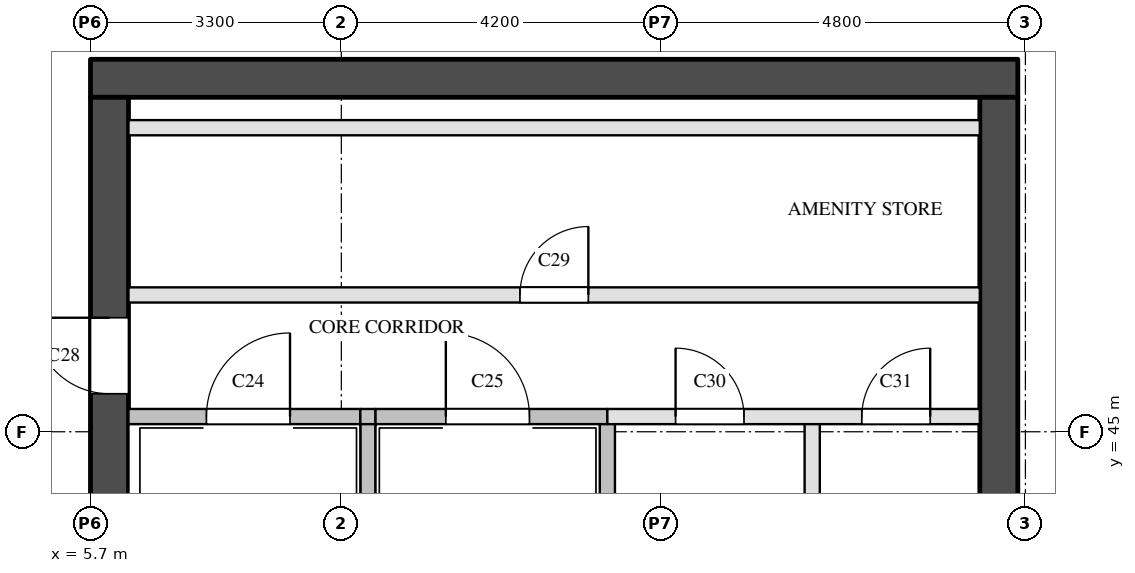
"""IFC4 building model, lengths in metres.
Left out: names, types, materials, properties, quantities, classifications, styles, units other than length and angle.
Written with IfcOpenShell. Run it as: python <this file> out.ifc"""

import sys

from ifc_helpers import new_model, si_unit, direction, frame, frame_2d, origin, place, context, subcontext, project, spatial, rectangle, extrude, element, fill, save


model = new_model("IFC4")
c1 = context("Model", 3, precision=1e-05, world=origin(), true_north=direction((0.0, 1.0)))
c2 = subcontext(c1, "Body", "Model", "MODEL_VIEW")
j1 = project(units=[si_unit("LENGTHUNIT", "METRE"), si_unit("PLANEANGLEUNIT", "RADIAN")], contexts=[c1])
p1 = place(None, origin())
s1 = spatial("IfcSite", under=j1, at=p1, CompositionType="ELEMENT")
p2 = place(p1, origin())
s2 = spatial("IfcBuilding", under=s1, at=p2, CompositionType="ELEMENT")
p3 = place(p2, frame((0.0, 0.0, 129.4)))
s3 = spatial("IfcBuildingStorey", under=s2, at=p3, CompositionType="ELEMENT", Elevation=129.4)
p4 = place(p3, frame((5.7, 49.65, 0.0), z_axis=(0.0, 0.0, 1.0), x_axis=(1.0, 0.0, 0.0)))
e1 = element("IfcWall", 1, at=p4, inside=s3, PredefinedType="SHEAR", context=c2, shape_type="SweptSolid", body=[
    extrude(rectangle(XDim=12.2, YDim=0.5, at=frame_2d((6.1, 0.0))), origin(), (0.0, 0.0, 1.0), 5.2),
])
p5 = place(p3, frame((5.95, 29.1, 0.0), z_axis=(0.0, 0.0, 1.0), x_axis=(0.0, 1.0, 0.0)))
e2 = element("IfcWall", 2, at=p5, inside=s3, PredefinedType="SHEAR", context=c2, shape_type="SweptSolid", body=[
    extrude(rectangle(XDim=20.3, YDim=0.5, at=frame_2d((10.15, 0.0))), origin(), (0.0, 0.0, 1.0), 5.2),
])
p6 = place(p5, frame((3.45, 0.0, 0.0)))
e3 = element("IfcOpeningElement", 3, at=p6, cuts=e2, PredefinedType="OPENING", context=c2, shape_type="SweptSolid", body=[
    extrude(rectangle(XDim=1.0, YDim=2.1, at=frame_2d((0.5, 1.05))), frame((0.0, 0.26, 0.0), z_axis=(0.0, -1.0, 0.0), x_axis=(1.0, 0.0, 0.0)), (0.0, 0.0, 1.0), 0.52),
])
p7 = place(p5, frame((16.4, 0.0, 0.0)))
e4 = element("IfcOpeningElement", 4, at=p7, cuts=e2, PredefinedType="OPENING", context=c2, shape_type="SweptSolid", body=[
    extrude(rectangle(XDim=1.0, YDim=2.1, at=frame_2d((0.5, 1.05))), frame((0.0, 0.26, 0.0), z_axis=(0.0, -1.0, 0.0), x_axis=(1.0, 0.0, 0.0)), (0.0, 0.0, 1.0), 0.52),
])
p8 = place(p3, frame((17.65, 29.1, 0.0), z_axis=(0.0, 0.0, 1.0), x_axis=(0.0, 1.0, 0.0)))
e5 = element("IfcWall", 5, at=p8, inside=s3, PredefinedType="SHEAR", context=c2, shape_type="SweptSolid", body=[
    extrude(rectangle(XDim=20.3, YDim=0.5, at=frame_2d((10.15, 0.0))), origin(), (0.0, 0.0, 1.0), 5.2),
])
p9 = place(p8, frame((1.25, 0.0, 0.0)))
e6 = element("IfcOpeningElement", 6, at=p9, cuts=e5, PredefinedType="OPENING", context=c2, shape_type="SweptSolid", body=[
    extrude(rectangle(XDim=0.7, YDim=2.1, at=frame_2d((0.35, 1.05))), frame((0.0, 0.26, 0.0), z_axis=(0.0, -1.0, 0.0), x_axis=(1.0, 0.0, 0.0)), (0.0, 0.0, 1.0), 0.52),
])
p10 = place(p8, frame((7.05, 0.0, 0.0)))
e7 = element("IfcOpeningElement", 7, at=p10, cuts=e5, PredefinedType="OPENING", context=c2, shape_type="SweptSolid", body=[
    extrude(rectangle(XDim=0.7, YDim=2.1, at=frame_2d((0.35, 1.05))), frame((0.0, 0.26, 0.0), z_axis=(0.0, -1.0, 0.0), x_axis=(1.0, 0.0, 0.0)), (0.0, 0.0, 1.0), 0.52),
])
p11 = place(p8, frame((3.6, 0.0, 0.0)))
e8 = element("IfcOpeningElement", 8, at=p11, cuts=e5, PredefinedType="OPENING", context=c2, shape_type="SweptSolid", body=[
    extrude(rectangle(XDim=1.8, YDim=2.1, at=frame_2d((0.9, 1.05))), frame((0.0, 0.26, 0.0), z_axis=(0.0, -1.0, 0.0), x_axis=(1.0, 0.0, 0.0)), (0.0, 0.0, 1.0), 0.52),
])
for number, where, z_axis, x_axis in (
    (9, (9.35, 43.7, 0.0), (0.0, 0.0, 1.0), (0.0, 1.0, 0.0)),
    (10, (12.5, 43.7, 0.0), (0.0, 0.0, 1.0), (0.0, 1.0, 0.0)),
):
    element("IfcWall", number, at=place(p3, frame(where, z_axis=z_axis, x_axis=x_axis)), inside=s3, PredefinedType="SOLIDWALL", context=c2, shape_type="SweptSolid", body=[
        extrude(rectangle(XDim=1.5, YDim=0.2, at=frame_2d((0.75, 0.0))), origin(), (0.0, 0.0, 1.0), 5.2),
    ])
p12 = place(p3, frame((15.195, 39.0, 0.0), z_axis=(0.0, 0.0, 1.0), x_axis=(0.0, 1.0, 0.0)))
e11 = element("IfcWall", 11, at=p12, inside=s3, PredefinedType="PARTITIONING", context=c2, shape_type="SweptSolid", body=[
    extrude(rectangle(XDim=6.2, YDim=0.2, at=frame_2d((3.1, 0.0))), origin(), (0.0, 0.0, 1.0), 5.2),
])
p13 = place(p3, frame((12.5, 45.2, 0.0), z_axis=(0.0, 0.0, 1.0), x_axis=(1.0, 0.0, 0.0)))
e12 = element("IfcWall", 12, at=p13, inside=s3, PredefinedType="PARTITIONING", context=c2, shape_type="SweptSolid", body=[
    extrude(rectangle(XDim=4.9, YDim=0.2, at=frame_2d((2.45, 0.0))), origin(), (0.0, 0.0, 1.0), 5.2),
])
p14 = place(p13, frame((0.897, 0.0, 0.0)))
e13 = element("IfcOpeningElement", 13, at=p14, cuts=e12, PredefinedType="OPENING", context=c2, shape_type="SweptSolid", body=[
    extrude(rectangle(XDim=0.9, YDim=2.1, at=frame_2d((0.45, 1.05))), frame((0.0, 0.11, 0.0), z_axis=(0.0, -1.0, 0.0), x_axis=(1.0, 0.0, 0.0)), (0.0, 0.0, 1.0), 0.22),
])
p15 = place(p13, frame((3.347, 0.0, 0.0)))
e14 = element("IfcOpeningElement", 14, at=p15, cuts=e12, PredefinedType="OPENING", context=c2, shape_type="SweptSolid", body=[
    extrude(rectangle(XDim=0.9, YDim=2.1, at=frame_2d((0.45, 1.05))), frame((0.0, 0.11, 0.0), z_axis=(0.0, -1.0, 0.0), x_axis=(1.0, 0.0, 0.0)), (0.0, 0.0, 1.0), 0.22),
])
p16 = place(p3, frame((6.2, 45.2, 0.0), z_axis=(0.0, 0.0, 1.0), x_axis=(1.0, 0.0, 0.0)))
e15 = element("IfcWall", 15, at=p16, inside=s3, PredefinedType="SOLIDWALL", context=c2, shape_type="SweptSolid", body=[
    extrude(rectangle(XDim=3.05, YDim=0.2, at=frame_2d((1.525, 0.0))), origin(), (0.0, 0.0, 1.0), 5.2),
])
p17 = place(p16, frame((1.025, 0.0, 0.0)))
e16 = element("IfcOpeningElement", 16, at=p17, cuts=e15, PredefinedType="OPENING", context=c2, shape_type="SweptSolid", body=[
    extrude(rectangle(XDim=1.1, YDim=2.1, at=frame_2d((0.55, 1.05))), frame((0.0, 0.11, 0.0), z_axis=(0.0, -1.0, 0.0), x_axis=(1.0, 0.0, 0.0)), (0.0, 0.0, 1.0), 0.22),
])
p18 = place(p3, frame((9.25, 45.2, 0.0), z_axis=(0.0, 0.0, 1.0), x_axis=(1.0, 0.0, 0.0)))
e17 = element("IfcWall", 17, at=p18, inside=s3, PredefinedType="SOLIDWALL", context=c2, shape_type="SweptSolid", body=[
    extrude(rectangle(XDim=0.2, YDim=0.2, at=frame_2d((0.1, 0.0))), origin(), (0.0, 0.0, 1.0), 5.2),
])
p19 = place(p3, frame((9.45, 45.2, 0.0), z_axis=(0.0, 0.0, 1.0), x_axis=(1.0, 0.0, 0.0)))
e18 = element("IfcWall", 18, at=p19, inside=s3, PredefinedType="SOLIDWALL", context=c2, shape_type="SweptSolid", body=[
    extrude(rectangle(XDim=3.05, YDim=0.2, at=frame_2d((1.525, 0.0))), origin(), (0.0, 0.0, 1.0), 5.2),
])
p20 = place(p19, frame((0.925, 0.0, 0.0)))
e19 = element("IfcOpeningElement", 19, at=p20, cuts=e18, PredefinedType="OPENING", context=c2, shape_type="SweptSolid", body=[
    extrude(rectangle(XDim=1.1, YDim=2.1, at=frame_2d((0.55, 1.05))), frame((0.0, 0.11, 0.0), z_axis=(0.0, -1.0, 0.0), x_axis=(1.0, 0.0, 0.0)), (0.0, 0.0, 1.0), 0.22),
])
p21 = place(p3, frame((6.2, 46.8, 0.0), z_axis=(0.0, 0.0, 1.0), x_axis=(1.0, 0.0, 0.0)))
e20 = element("IfcWall", 20, at=p21, inside=s3, PredefinedType="PARTITIONING", context=c2, shape_type="SweptSolid", body=[
    extrude(rectangle(XDim=11.2, YDim=0.2, at=frame_2d((5.6, 0.0))), origin(), (0.0, 0.0, 1.0), 5.2),
])
p22 = place(p21, frame((5.15, 0.0, 0.0)))
e21 = element("IfcOpeningElement", 21, at=p22, cuts=e20, PredefinedType="OPENING", context=c2, shape_type="SweptSolid", body=[
    extrude(rectangle(XDim=0.9, YDim=2.1, at=frame_2d((0.45, 1.05))), frame((0.0, 0.11, 0.0), z_axis=(0.0, -1.0, 0.0), x_axis=(1.0, 0.0, 0.0)), (0.0, 0.0, 1.0), 0.22),
])
p23 = place(p3, frame((6.2, 49.0, 0.0), z_axis=(0.0, 0.0, 1.0), x_axis=(1.0, 0.0, 0.0)))
e22 = element("IfcWall", 22, at=p23, inside=s3, PredefinedType="PARTITIONING", context=c2, shape_type="SweptSolid", body=[
    extrude(rectangle(XDim=11.2, YDim=0.2, at=frame_2d((5.6, 0.0))), origin(), (0.0, 0.0, 1.0), 5.2),
])
p24 = place(p17, origin())
e23 = element("IfcDoor", 23, at=p24, inside=s3, OperationType="SINGLE_SWING_RIGHT", PredefinedType="DOOR", context=c2, shape_type="SweptSolid", body=[
    extrude(rectangle(XDim=1.1, YDim=2.1, at=frame_2d((0.55, 1.05))), frame((0.0, 0.025, 0.0), z_axis=(0.0, -1.0, 0.0), x_axis=(1.0, 0.0, 0.0)), (0.0, 0.0, 1.0), 0.05),
])
fill(e16, e23)
p25 = place(p20, origin())
e24 = element("IfcDoor", 24, at=p25, inside=s3, OperationType="SINGLE_SWING_LEFT", PredefinedType="DOOR", context=c2, shape_type="SweptSolid", body=[
    extrude(rectangle(XDim=1.1, YDim=2.1, at=frame_2d((0.55, 1.05))), frame((0.0, 0.025, 0.0), z_axis=(0.0, -1.0, 0.0), x_axis=(1.0, 0.0, 0.0)), (0.0, 0.0, 1.0), 0.05),
])
fill(e19, e24)
p26 = place(p7, origin())
e25 = element("IfcDoor", 25, at=p26, inside=s3, OperationType="SINGLE_SWING_RIGHT", PredefinedType="DOOR", context=c2, shape_type="SweptSolid", body=[
    extrude(rectangle(XDim=1.0, YDim=2.1, at=frame_2d((0.5, 1.05))), frame((0.0, 0.025, 0.0), z_axis=(0.0, -1.0, 0.0), x_axis=(1.0, 0.0, 0.0)), (0.0, 0.0, 1.0), 0.05),
])
fill(e4, e25)
p27 = place(p22, origin())
e26 = element("IfcDoor", 26, at=p27, inside=s3, OperationType="SINGLE_SWING_RIGHT", PredefinedType="DOOR", context=c2, shape_type="SweptSolid", body=[
    extrude(rectangle(XDim=0.9, YDim=2.1, at=frame_2d((0.45, 1.05))), frame((0.0, 0.025, 0.0), z_axis=(0.0, -1.0, 0.0), x_axis=(1.0, 0.0, 0.0)), (0.0, 0.0, 1.0), 0.05),
])
fill(e21, e26)
p28 = place(p14, origin())
e27 = element("IfcDoor", 27, at=p28, inside=s3, OperationType="SINGLE_SWING_LEFT", PredefinedType="DOOR", context=c2, shape_type="SweptSolid", body=[
    extrude(rectangle(XDim=0.9, YDim=2.1, at=frame_2d((0.45, 1.05))), frame((0.0, 0.025, 0.0), z_axis=(0.0, -1.0, 0.0), x_axis=(1.0, 0.0, 0.0)), (0.0, 0.0, 1.0), 0.05),
])
fill(e13, e27)
p29 = place(p15, origin())
e28 = element("IfcDoor", 28, at=p29, inside=s3, OperationType="SINGLE_SWING_RIGHT", PredefinedType="DOOR", context=c2, shape_type="SweptSolid", body=[
    extrude(rectangle(XDim=0.9, YDim=2.1, at=frame_2d((0.45, 1.05))), frame((0.0, 0.025, 0.0), z_axis=(0.0, -1.0, 0.0), x_axis=(1.0, 0.0, 0.0)), (0.0, 0.0, 1.0), 0.05),
])
fill(e14, e28)
save(model, sys.argv[1])
